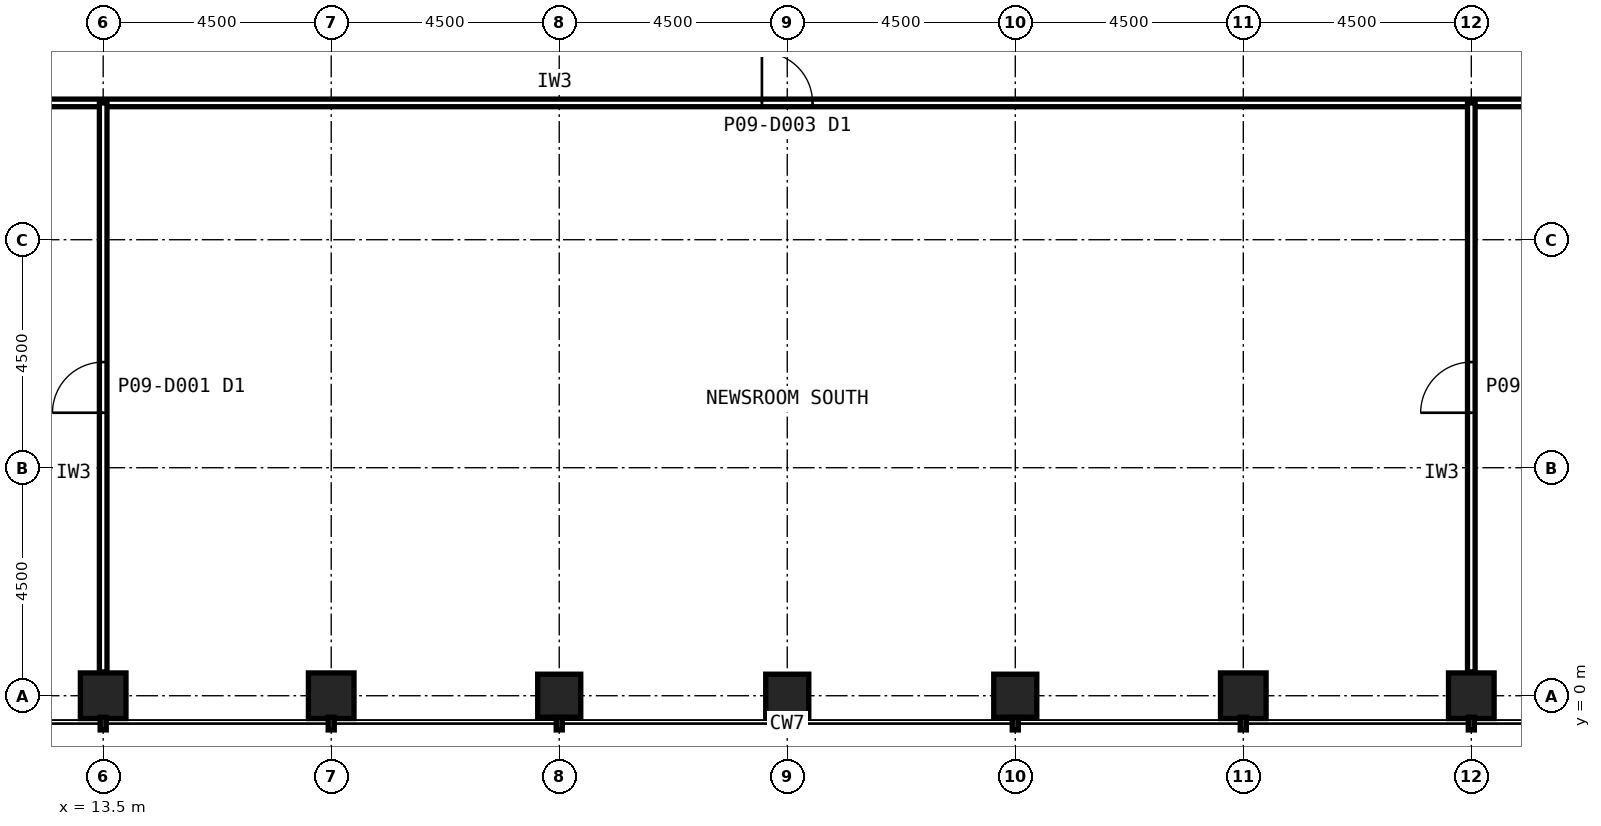
"""IFC4 building model, lengths in metres.
Left out: names, types, materials, properties, quantities, classifications, styles, units other than length and angle.
Written with IfcOpenShell. Run it as: python <this file> out.ifc"""

import sys

from ifc_helpers import new_model, si_unit, direction, frame, frame_2d, origin, origin_2d, place, context, subcontext, project, spatial, rectangle, hollow_rectangle, extrude, element, fill, save


model = new_model("IFC4")
c1 = context("Model", 3, precision=1e-05, world=origin(), true_north=direction((0.0, 1.0)))
c2 = subcontext(c1, "Body", "Model", "MODEL_VIEW")
j1 = project(units=[si_unit("LENGTHUNIT", "METRE"), si_unit("PLANEANGLEUNIT", "RADIAN")], contexts=[c1])
p1 = place(None, origin())
s1 = spatial("IfcSite", under=j1, at=p1, CompositionType="ELEMENT")
p2 = place(p1, origin())
s2 = spatial("IfcBuilding", under=s1, at=p2, CompositionType="ELEMENT")
p3 = place(p2, frame((0.0, 0.0, 41.6)))
s3 = spatial("IfcBuildingStorey", under=s2, at=p3, CompositionType="ELEMENT", Elevation=41.6)
for number, where, z_axis, x_axis in (
    (1, (13.5, 0.0, 0.0), (0.0, 0.0, 1.0), (1.0, 0.0, 0.0)),
    (2, (18.0, 0.0, 0.0), (0.0, 0.0, 1.0), (1.0, 0.0, 0.0)),
):
    element("IfcColumn", number, at=place(p3, frame(where, z_axis=z_axis, x_axis=x_axis)), inside=s3, PredefinedType="COLUMN", context=c2, shape_type="SweptSolid", body=[
        extrude(hollow_rectangle(XDim=0.9, YDim=0.9, WallThickness=0.063, at=origin_2d()), origin(), (0.0, 0.0, 1.0), 4.2),
    ])
for number, where, z_axis, x_axis in (
    (3, (22.5, 0.0, 0.0), (0.0, 0.0, 1.0), (1.0, 0.0, 0.0)),
    (4, (27.0, 0.0, 0.0), (0.0, 0.0, 1.0), (1.0, 0.0, 0.0)),
    (5, (31.5, 0.0, 0.0), (0.0, 0.0, 1.0), (1.0, 0.0, 0.0)),
):
    element("IfcColumn", number, at=place(p3, frame(where, z_axis=z_axis, x_axis=x_axis)), inside=s3, PredefinedType="COLUMN", context=c2, shape_type="SweptSolid", body=[
        extrude(hollow_rectangle(XDim=0.85, YDim=0.85, WallThickness=0.05, at=origin_2d()), origin(), (0.0, 0.0, 1.0), 4.2),
    ])
for number, where, z_axis, x_axis in (
    (6, (36.0, 0.0, 0.0), (0.0, 0.0, 1.0), (1.0, 0.0, 0.0)),
    (7, (40.5, 0.0, 0.0), (0.0, 0.0, 1.0), (1.0, 0.0, 0.0)),
):
    element("IfcColumn", number, at=place(p3, frame(where, z_axis=z_axis, x_axis=x_axis)), inside=s3, PredefinedType="COLUMN", context=c2, shape_type="SweptSolid", body=[
        extrude(hollow_rectangle(XDim=0.9, YDim=0.9, WallThickness=0.063, at=origin_2d()), origin(), (0.0, 0.0, 1.0), 4.2),
    ])
p4 = place(p3, frame((11.7, 11.7, 0.0), z_axis=(0.0, 0.0, 1.0), x_axis=(1.0, 0.0, 0.0)))
e8 = element("IfcWall", 8, at=p4, inside=s3, PredefinedType="PARTITIONING", context=c2, shape_type="SweptSolid", body=[
    extrude(rectangle(XDim=30.6, YDim=0.15, at=frame_2d((15.3, 0.0))), origin(), (0.0, 0.0, 1.0), 4.04),
])
p5 = place(p4, frame((14.8, 0.0, 0.0)))
e9 = element("IfcOpeningElement", 9, at=p5, cuts=e8, PredefinedType="OPENING", context=c2, shape_type="SweptSolid", body=[
    extrude(rectangle(XDim=1.0, YDim=2.1, at=frame_2d((0.5, 1.05))), frame((0.0, 0.085, 0.0), z_axis=(0.0, -1.0, 0.0), x_axis=(1.0, 0.0, 0.0)), (0.0, 0.0, 1.0), 0.17),
])
p6 = place(p3, frame((40.5, 0.47, 0.0), z_axis=(0.0, 0.0, 1.0), x_axis=(0.0, 1.0, 0.0)))
e10 = element("IfcWall", 10, at=p6, inside=s3, PredefinedType="PARTITIONING", context=c2, shape_type="SweptSolid", body=[
    extrude(rectangle(XDim=11.23, YDim=0.15, at=frame_2d((5.615, 0.0))), origin(), (0.0, 0.0, 1.0), 3.189),
])
p7 = place(p6, frame((5.115, 0.0, 0.0)))
e11 = element("IfcOpeningElement", 11, at=p7, cuts=e10, PredefinedType="OPENING", context=c2, shape_type="SweptSolid", body=[
    extrude(rectangle(XDim=1.0, YDim=2.1, at=frame_2d((0.5, 1.05))), frame((0.0, 0.085, 0.0), z_axis=(0.0, -1.0, 0.0), x_axis=(1.0, 0.0, 0.0)), (0.0, 0.0, 1.0), 0.17),
])
p8 = place(p3, frame((13.5, 0.47, 0.0), z_axis=(0.0, 0.0, 1.0), x_axis=(0.0, 1.0, 0.0)))
e12 = element("IfcWall", 12, at=p8, inside=s3, PredefinedType="PARTITIONING", context=c2, shape_type="SweptSolid", body=[
    extrude(rectangle(XDim=11.23, YDim=0.15, at=frame_2d((5.615, 0.0))), origin(), (0.0, 0.0, 1.0), 3.189),
])
p9 = place(p8, frame((5.115, 0.0, 0.0)))
e13 = element("IfcOpeningElement", 13, at=p9, cuts=e12, PredefinedType="OPENING", context=c2, shape_type="SweptSolid", body=[
    extrude(rectangle(XDim=1.0, YDim=2.1, at=frame_2d((0.5, 1.05))), frame((0.0, 0.085, 0.0), z_axis=(0.0, -1.0, 0.0), x_axis=(1.0, 0.0, 0.0)), (0.0, 0.0, 1.0), 0.17),
])
p10 = place(p5, origin())
e14 = element("IfcDoor", 14, at=p10, inside=s3, OperationType="SINGLE_SWING_LEFT", PredefinedType="DOOR", context=c2, shape_type="SweptSolid", body=[
    extrude(rectangle(XDim=1.0, YDim=2.1, at=frame_2d((0.5, 1.05))), frame((0.0, 0.025, 0.0), z_axis=(0.0, -1.0, 0.0), x_axis=(1.0, 0.0, 0.0)), (0.0, 0.0, 1.0), 0.05),
])
fill(e9, e14)
p11 = place(p7, origin())
e15 = element("IfcDoor", 15, at=p11, inside=s3, OperationType="SINGLE_SWING_LEFT", PredefinedType="DOOR", context=c2, shape_type="SweptSolid", body=[
    extrude(rectangle(XDim=1.0, YDim=2.1, at=frame_2d((0.5, 1.05))), frame((0.0, 0.025, 0.0), z_axis=(0.0, -1.0, 0.0), x_axis=(1.0, 0.0, 0.0)), (0.0, 0.0, 1.0), 0.05),
])
fill(e11, e15)
p12 = place(p9, origin())
e16 = element("IfcDoor", 16, at=p12, inside=s3, OperationType="SINGLE_SWING_LEFT", PredefinedType="DOOR", context=c2, shape_type="SweptSolid", body=[
    extrude(rectangle(XDim=1.0, YDim=2.1, at=frame_2d((0.5, 1.05))), frame((0.0, 0.025, 0.0), z_axis=(0.0, -1.0, 0.0), x_axis=(1.0, 0.0, 0.0)), (0.0, 0.0, 1.0), 0.05),
])
fill(e13, e16)
save(model, sys.argv[1])
